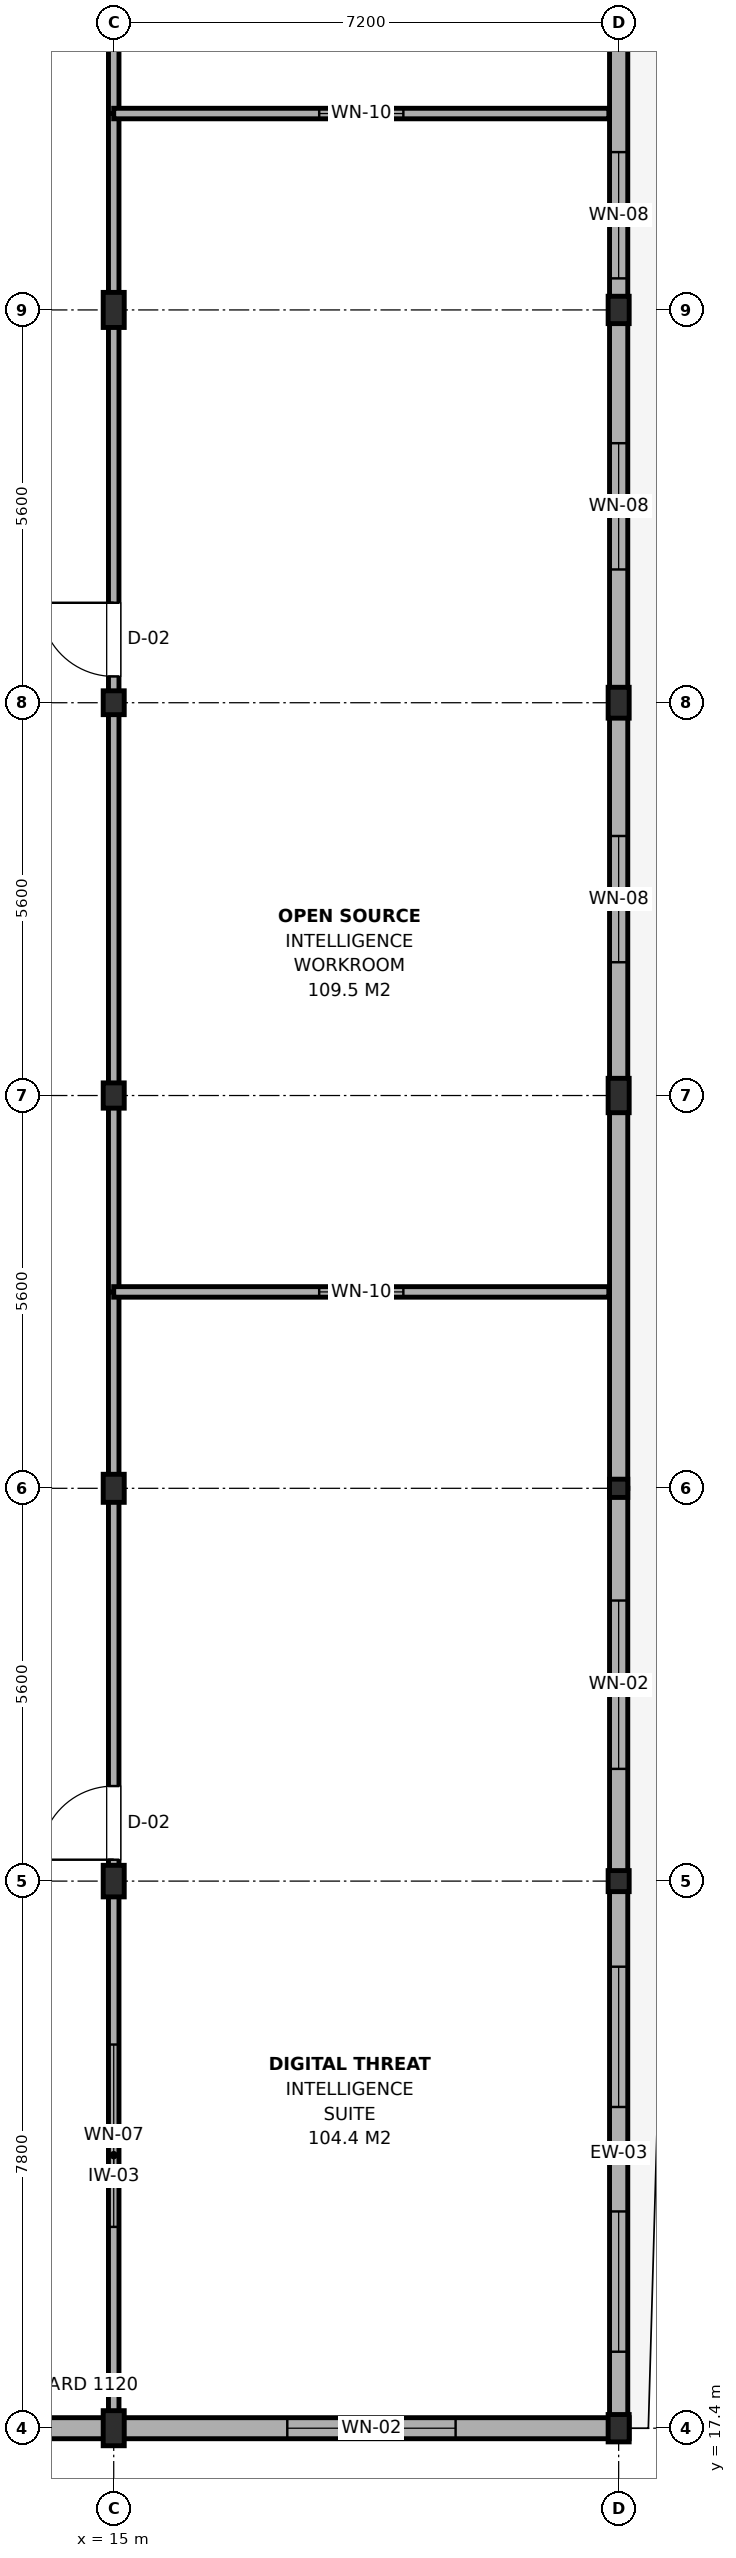
"""IFC4 building model, lengths in metres.
Left out: names, types, materials, properties, quantities, classifications, styles, units other than length and angle.
Written with IfcOpenShell. Run it as: python <this file> out.ifc"""

import sys

from ifc_helpers import new_model, si_unit, direction, frame, frame_2d, origin, origin_2d, place, context, subcontext, project, spatial, rectangle, i_section, extrude, element, fill, save


model = new_model("IFC4")
c1 = context("Model", 3, precision=1e-05, world=origin(), true_north=direction((0.0, 1.0)))
c2 = subcontext(c1, "Body", "Model", "MODEL_VIEW")
j1 = project(units=[si_unit("LENGTHUNIT", "METRE"), si_unit("PLANEANGLEUNIT", "RADIAN")], contexts=[c1])
p1 = place(None, origin())
s1 = spatial("IfcSite", under=j1, at=p1, CompositionType="ELEMENT")
p2 = place(p1, origin())
s2 = spatial("IfcBuilding", under=s1, at=p2, CompositionType="ELEMENT")
p3 = place(p2, frame((0.0, 0.0, 21.0)))
s3 = spatial("IfcBuildingStorey", under=s2, at=p3, CompositionType="ELEMENT", Elevation=21.0)
p4 = place(p3, frame((15.0, 17.4, 0.0), z_axis=(0.0, 0.0, 1.0), x_axis=(1.0, 0.0, 0.0)))
e1 = element("IfcColumn", 1, at=p4, inside=s3, PredefinedType="COLUMN", context=c2, shape_type="SweptSolid", body=[
    extrude(i_section(OverallWidth=0.3, OverallDepth=0.5, WebThickness=0.014, FlangeThickness=0.028, FilletRadius=0.027, at=origin_2d()), origin(), (0.0, 0.0, 1.0), 3.9),
])
p5 = place(p3, frame((15.0, 25.2, 0.0), z_axis=(0.0, 0.0, 1.0), x_axis=(1.0, 0.0, 0.0)))
e2 = element("IfcColumn", 2, at=p5, inside=s3, PredefinedType="COLUMN", context=c2, shape_type="SweptSolid", body=[
    extrude(i_section(OverallWidth=0.3, OverallDepth=0.45, WebThickness=0.014, FlangeThickness=0.026, FilletRadius=0.027, at=origin_2d()), origin(), (0.0, 0.0, 1.0), 3.9),
])
p6 = place(p3, frame((15.0, 30.8, 0.0), z_axis=(0.0, 0.0, 1.0), x_axis=(1.0, 0.0, 0.0)))
e3 = element("IfcColumn", 3, at=p6, inside=s3, PredefinedType="COLUMN", context=c2, shape_type="SweptSolid", body=[
    extrude(i_section(OverallWidth=0.3, OverallDepth=0.4, WebThickness=0.013, FlangeThickness=0.024, FilletRadius=0.027, at=origin_2d()), origin(), (0.0, 0.0, 1.0), 3.9),
])
p7 = place(p3, frame((15.0, 36.4, 0.0), z_axis=(0.0, 0.0, 1.0), x_axis=(1.0, 0.0, 0.0)))
e4 = element("IfcColumn", 4, at=p7, inside=s3, PredefinedType="COLUMN", context=c2, shape_type="SweptSolid", body=[
    extrude(i_section(OverallWidth=0.3, OverallDepth=0.36, WebThickness=0.012, FlangeThickness=0.022, FilletRadius=0.027, at=origin_2d()), origin(), (0.0, 0.0, 1.0), 3.9),
])
p8 = place(p3, frame((15.0, 42.0, 0.0), z_axis=(0.0, 0.0, 1.0), x_axis=(1.0, 0.0, 0.0)))
e5 = element("IfcColumn", 5, at=p8, inside=s3, PredefinedType="COLUMN", context=c2, shape_type="SweptSolid", body=[
    extrude(i_section(OverallWidth=0.3, OverallDepth=0.34, WebThickness=0.012, FlangeThickness=0.021, FilletRadius=0.027, at=origin_2d()), origin(), (0.0, 0.0, 1.0), 3.9),
])
p9 = place(p3, frame((15.0, 47.6, 0.0), z_axis=(0.0, 0.0, 1.0), x_axis=(1.0, 0.0, 0.0)))
e6 = element("IfcColumn", 6, at=p9, inside=s3, PredefinedType="COLUMN", context=c2, shape_type="SweptSolid", body=[
    extrude(i_section(OverallWidth=0.3, OverallDepth=0.5, WebThickness=0.014, FlangeThickness=0.028, FilletRadius=0.027, at=origin_2d()), origin(), (0.0, 0.0, 1.0), 3.9),
])
p10 = place(p3, frame((22.2, 17.4, 0.0), z_axis=(0.0, 0.0, 1.0), x_axis=(1.0, 0.0, 0.0)))
e7 = element("IfcColumn", 7, at=p10, inside=s3, PredefinedType="COLUMN", context=c2, shape_type="SweptSolid", body=[
    extrude(i_section(OverallWidth=0.3, OverallDepth=0.39, WebThickness=0.011, FlangeThickness=0.019, FilletRadius=0.027, at=origin_2d()), origin(), (0.0, 0.0, 1.0), 3.9),
])
p11 = place(p3, frame((22.2, 25.2, 0.0), z_axis=(0.0, 0.0, 1.0), x_axis=(1.0, 0.0, 0.0)))
e8 = element("IfcColumn", 8, at=p11, inside=s3, PredefinedType="COLUMN", context=c2, shape_type="SweptSolid", body=[
    extrude(i_section(OverallWidth=0.3, OverallDepth=0.3, WebThickness=0.011, FlangeThickness=0.019, FilletRadius=0.027, at=origin_2d()), origin(), (0.0, 0.0, 1.0), 3.9),
])
p12 = place(p3, frame((22.2, 30.8, 0.0), z_axis=(0.0, 0.0, 1.0), x_axis=(1.0, 0.0, 0.0)))
e9 = element("IfcColumn", 9, at=p12, inside=s3, PredefinedType="COLUMN", context=c2, shape_type="SweptSolid", body=[
    extrude(i_section(OverallWidth=0.26, OverallDepth=0.26, WebThickness=0.01, FlangeThickness=0.018, FilletRadius=0.024, at=origin_2d()), origin(), (0.0, 0.0, 1.0), 3.9),
])
p13 = place(p3, frame((22.2, 36.4, 0.0), z_axis=(0.0, 0.0, 1.0), x_axis=(1.0, 0.0, 0.0)))
e10 = element("IfcColumn", 10, at=p13, inside=s3, PredefinedType="COLUMN", context=c2, shape_type="SweptSolid", body=[
    extrude(i_section(OverallWidth=0.3, OverallDepth=0.49, WebThickness=0.012, FlangeThickness=0.023, FilletRadius=0.027, at=origin_2d()), origin(), (0.0, 0.0, 1.0), 3.9),
])
p14 = place(p3, frame((22.2, 42.0, 0.0), z_axis=(0.0, 0.0, 1.0), x_axis=(1.0, 0.0, 0.0)))
e11 = element("IfcColumn", 11, at=p14, inside=s3, PredefinedType="COLUMN", context=c2, shape_type="SweptSolid", body=[
    extrude(i_section(OverallWidth=0.3, OverallDepth=0.44, WebThickness=0.011, FlangeThickness=0.021, FilletRadius=0.027, at=origin_2d()), origin(), (0.0, 0.0, 1.0), 3.9),
])
p15 = place(p3, frame((22.2, 47.6, 0.0), z_axis=(0.0, 0.0, 1.0), x_axis=(1.0, 0.0, 0.0)))
e12 = element("IfcColumn", 12, at=p15, inside=s3, PredefinedType="COLUMN", context=c2, shape_type="SweptSolid", body=[
    extrude(i_section(OverallWidth=0.3, OverallDepth=0.39, WebThickness=0.011, FlangeThickness=0.019, FilletRadius=0.027, at=origin_2d()), origin(), (0.0, 0.0, 1.0), 3.9),
])
p16 = place(p3, frame((22.2, 17.27, 0.0), z_axis=(0.0, 0.0, 1.0), x_axis=(0.0, 1.0, 0.0)))
e13 = element("IfcWall", 13, at=p16, inside=s3, PredefinedType="SOLIDWALL", context=c2, shape_type="SweptSolid", body=[
    extrude(rectangle(XDim=7.93, YDim=0.26, at=frame_2d((3.965, 0.0))), origin(), (0.0, 0.0, 1.0), 3.245),
])
p17 = place(p16, frame((1.22, 0.0, 0.9)))
e14 = element("IfcOpeningElement", 14, at=p17, cuts=e13, PredefinedType="OPENING", context=c2, shape_type="SweptSolid", body=[
    extrude(rectangle(XDim=2.0, YDim=1.8, at=frame_2d((1.0, 0.9))), frame((0.0, 0.145, 0.0), z_axis=(0.0, -1.0, 0.0), x_axis=(1.0, 0.0, 0.0)), (0.0, 0.0, 1.0), 0.29),
])
p18 = place(p16, frame((4.71, 0.0, 0.9)))
e15 = element("IfcOpeningElement", 15, at=p18, cuts=e13, PredefinedType="OPENING", context=c2, shape_type="SweptSolid", body=[
    extrude(rectangle(XDim=2.0, YDim=1.8, at=frame_2d((1.0, 0.9))), frame((0.0, 0.145, 0.0), z_axis=(0.0, -1.0, 0.0), x_axis=(1.0, 0.0, 0.0)), (0.0, 0.0, 1.0), 0.29),
])
p19 = place(p3, frame((22.2, 25.2, 0.0), z_axis=(0.0, 0.0, 1.0), x_axis=(0.0, 1.0, 0.0)))
e16 = element("IfcWall", 16, at=p19, inside=s3, PredefinedType="SOLIDWALL", context=c2, shape_type="SweptSolid", body=[
    extrude(rectangle(XDim=5.6, YDim=0.26, at=frame_2d((2.8, 0.0))), origin(), (0.0, 0.0, 1.0), 3.245),
])
p20 = place(p19, frame((1.6, 0.0, 0.9)))
e17 = element("IfcOpeningElement", 17, at=p20, cuts=e16, PredefinedType="OPENING", context=c2, shape_type="SweptSolid", body=[
    extrude(rectangle(XDim=2.4, YDim=2.1, at=frame_2d((1.2, 1.05))), frame((0.0, 0.145, 0.0), z_axis=(0.0, -1.0, 0.0), x_axis=(1.0, 0.0, 0.0)), (0.0, 0.0, 1.0), 0.29),
])
p21 = place(p3, frame((22.2, 30.8, 0.0), z_axis=(0.0, 0.0, 1.0), x_axis=(0.0, 1.0, 0.0)))
e18 = element("IfcWall", 18, at=p21, inside=s3, PredefinedType="SOLIDWALL", context=c2, shape_type="SweptSolid", body=[
    extrude(rectangle(XDim=5.6, YDim=0.26, at=frame_2d((2.8, 0.0))), origin(), (0.0, 0.0, 1.0), 3.095),
])
p22 = place(p3, frame((22.2, 36.4, 0.0), z_axis=(0.0, 0.0, 1.0), x_axis=(0.0, 1.0, 0.0)))
e19 = element("IfcWall", 19, at=p22, inside=s3, PredefinedType="SOLIDWALL", context=c2, shape_type="SweptSolid", body=[
    extrude(rectangle(XDim=5.6, YDim=0.26, at=frame_2d((2.8, 0.0))), origin(), (0.0, 0.0, 1.0), 3.095),
])
p23 = place(p22, frame((1.9, 0.0, 0.65)))
e20 = element("IfcOpeningElement", 20, at=p23, cuts=e19, PredefinedType="OPENING", context=c2, shape_type="SweptSolid", body=[
    extrude(rectangle(XDim=1.8, YDim=1.2, at=frame_2d((0.9, 0.6))), frame((0.0, 0.145, 0.0), z_axis=(0.0, -1.0, 0.0), x_axis=(1.0, 0.0, 0.0)), (0.0, 0.0, 1.0), 0.29),
])
p24 = place(p3, frame((22.2, 42.0, 0.0), z_axis=(0.0, 0.0, 1.0), x_axis=(0.0, 1.0, 0.0)))
e21 = element("IfcWall", 21, at=p24, inside=s3, PredefinedType="SOLIDWALL", context=c2, shape_type="SweptSolid", body=[
    extrude(rectangle(XDim=5.6, YDim=0.26, at=frame_2d((2.8, 0.0))), origin(), (0.0, 0.0, 1.0), 3.095),
])
p25 = place(p24, frame((1.9, 0.0, 0.65)))
e22 = element("IfcOpeningElement", 22, at=p25, cuts=e21, PredefinedType="OPENING", context=c2, shape_type="SweptSolid", body=[
    extrude(rectangle(XDim=1.8, YDim=1.2, at=frame_2d((0.9, 0.6))), frame((0.0, 0.145, 0.0), z_axis=(0.0, -1.0, 0.0), x_axis=(1.0, 0.0, 0.0)), (0.0, 0.0, 1.0), 0.29),
])
p26 = place(p3, frame((22.2, 47.6, 0.0), z_axis=(0.0, 0.0, 1.0), x_axis=(0.0, 1.0, 0.0)))
e23 = element("IfcWall", 23, at=p26, inside=s3, PredefinedType="SOLIDWALL", context=c2, shape_type="SweptSolid", body=[
    extrude(rectangle(XDim=5.6, YDim=0.26, at=frame_2d((2.8, 0.0))), origin(), (0.0, 0.0, 1.0), 3.145),
])
p27 = place(p26, frame((0.45, 0.0, 0.65)))
e24 = element("IfcOpeningElement", 24, at=p27, cuts=e23, PredefinedType="OPENING", context=c2, shape_type="SweptSolid", body=[
    extrude(rectangle(XDim=1.8, YDim=1.2, at=frame_2d((0.9, 0.6))), frame((0.0, 0.145, 0.0), z_axis=(0.0, -1.0, 0.0), x_axis=(1.0, 0.0, 0.0)), (0.0, 0.0, 1.0), 0.29),
])
p28 = place(p3, frame((7.8, 17.4, 0.0), z_axis=(0.0, 0.0, 1.0), x_axis=(1.0, 0.0, 0.0)))
e25 = element("IfcWall", 25, at=p28, inside=s3, PredefinedType="SOLIDWALL", context=c2, shape_type="SweptSolid", body=[
    extrude(rectangle(XDim=7.2, YDim=0.3, at=frame_2d((3.6, 0.0))), origin(), (0.0, 0.0, 1.0), 3.245),
])
p29 = place(p28, frame((1.45, 0.0, 0.9)))
e26 = element("IfcOpeningElement", 26, at=p29, cuts=e25, PredefinedType="OPENING", context=c2, shape_type="SweptSolid", body=[
    extrude(rectangle(XDim=2.4, YDim=2.1, at=frame_2d((1.2, 1.05))), frame((0.0, 0.165, 0.0), z_axis=(0.0, -1.0, 0.0), x_axis=(1.0, 0.0, 0.0)), (0.0, 0.0, 1.0), 0.33),
])
p30 = place(p3, frame((15.0, 17.4, 0.0), z_axis=(0.0, 0.0, 1.0), x_axis=(1.0, 0.0, 0.0)))
e27 = element("IfcWall", 27, at=p30, inside=s3, PredefinedType="SOLIDWALL", context=c2, shape_type="SweptSolid", body=[
    extrude(rectangle(XDim=7.35, YDim=0.3, at=frame_2d((3.675, 0.0))), origin(), (0.0, 0.0, 1.0), 3.345),
])
p31 = place(p30, frame((2.475, 0.0, 0.9)))
e28 = element("IfcOpeningElement", 28, at=p31, cuts=e27, PredefinedType="OPENING", context=c2, shape_type="SweptSolid", body=[
    extrude(rectangle(XDim=2.4, YDim=2.1, at=frame_2d((1.2, 1.05))), frame((0.0, 0.165, 0.0), z_axis=(0.0, -1.0, 0.0), x_axis=(1.0, 0.0, 0.0)), (0.0, 0.0, 1.0), 0.33),
])
p32 = place(p3, frame((15.0, 17.56, 0.0), z_axis=(0.0, 0.0, 1.0), x_axis=(0.0, 1.0, 0.0)))
e29 = element("IfcWall", 29, at=p32, inside=s3, PredefinedType="PARTITIONING", context=c2, shape_type="SweptSolid", body=[
    extrude(rectangle(XDim=16.04, YDim=0.15, at=frame_2d((8.02, 0.0))), origin(), (0.0, 0.0, 1.0), 3.095),
])
p33 = place(p32, frame((7.945, 0.0, 0.0)))
e30 = element("IfcOpeningElement", 30, at=p33, cuts=e29, PredefinedType="OPENING", context=c2, shape_type="SweptSolid", body=[
    extrude(rectangle(XDim=1.05, YDim=2.15, at=frame_2d((0.525, 1.075))), frame((0.0, 0.09, 0.0), z_axis=(0.0, -1.0, 0.0), x_axis=(1.0, 0.0, 0.0)), (0.0, 0.0, 1.0), 0.18),
])
p34 = place(p32, frame((2.71, 0.0, 0.95)))
e31 = element("IfcOpeningElement", 31, at=p34, cuts=e29, PredefinedType="OPENING", context=c2, shape_type="SweptSolid", body=[
    extrude(rectangle(XDim=2.6, YDim=1.5, at=frame_2d((1.3, 0.75))), frame((0.0, 0.09, 0.0), z_axis=(0.0, -1.0, 0.0), x_axis=(1.0, 0.0, 0.0)), (0.0, 0.0, 1.0), 0.18),
])
p35 = place(p3, frame((15.0, 33.6, 0.0), z_axis=(0.0, 0.0, 1.0), x_axis=(0.0, 1.0, 0.0)))
e32 = element("IfcWall", 32, at=p35, inside=s3, PredefinedType="PARTITIONING", context=c2, shape_type="SweptSolid", body=[
    extrude(rectangle(XDim=16.8, YDim=0.15, at=frame_2d((8.4, 0.0))), origin(), (0.0, 0.0, 1.0), 3.095),
])
p36 = place(p35, frame((8.775, 0.0, 0.0)))
e33 = element("IfcOpeningElement", 33, at=p36, cuts=e32, PredefinedType="OPENING", context=c2, shape_type="SweptSolid", body=[
    extrude(rectangle(XDim=1.05, YDim=2.15, at=frame_2d((0.525, 1.075))), frame((0.0, 0.09, 0.0), z_axis=(0.0, -1.0, 0.0), x_axis=(1.0, 0.0, 0.0)), (0.0, 0.0, 1.0), 0.18),
])
p37 = place(p3, frame((15.0, 33.6, 0.0), z_axis=(0.0, 0.0, 1.0), x_axis=(1.0, 0.0, 0.0)))
e34 = element("IfcWall", 34, at=p37, inside=s3, PredefinedType="PARTITIONING", context=c2, shape_type="SweptSolid", body=[
    extrude(rectangle(XDim=7.06, YDim=0.15, at=frame_2d((3.53, 0.0))), origin(), (0.0, 0.0, 1.0), 3.145),
])
p38 = place(p37, frame((2.93, 0.0, 0.95)))
e35 = element("IfcOpeningElement", 35, at=p38, cuts=e34, PredefinedType="OPENING", context=c2, shape_type="SweptSolid", body=[
    extrude(rectangle(XDim=1.2, YDim=1.5, at=frame_2d((0.6, 0.75))), frame((0.0, 0.09, 0.0), z_axis=(0.0, -1.0, 0.0), x_axis=(1.0, 0.0, 0.0)), (0.0, 0.0, 1.0), 0.18),
])
p39 = place(p3, frame((15.0, 50.4, 0.0), z_axis=(0.0, 0.0, 1.0), x_axis=(0.0, 1.0, 0.0)))
e36 = element("IfcWall", 36, at=p39, inside=s3, PredefinedType="PARTITIONING", context=c2, shape_type="SweptSolid", body=[
    extrude(rectangle(XDim=16.2, YDim=0.15, at=frame_2d((8.1, 0.0))), origin(), (0.0, 0.0, 1.0), 3.095),
])
p40 = place(p39, frame((7.125, 0.0, 0.0)))
e37 = element("IfcOpeningElement", 37, at=p40, cuts=e36, PredefinedType="OPENING", context=c2, shape_type="SweptSolid", body=[
    extrude(rectangle(XDim=1.05, YDim=2.15, at=frame_2d((0.525, 1.075))), frame((0.0, 0.09, 0.0), z_axis=(0.0, -1.0, 0.0), x_axis=(1.0, 0.0, 0.0)), (0.0, 0.0, 1.0), 0.18),
])
p41 = place(p39, frame((10.85, 0.0, 0.95)))
e38 = element("IfcOpeningElement", 38, at=p41, cuts=e36, PredefinedType="OPENING", context=c2, shape_type="SweptSolid", body=[
    extrude(rectangle(XDim=2.6, YDim=1.5, at=frame_2d((1.3, 0.75))), frame((0.0, 0.09, 0.0), z_axis=(0.0, -1.0, 0.0), x_axis=(1.0, 0.0, 0.0)), (0.0, 0.0, 1.0), 0.18),
])
p42 = place(p3, frame((15.0, 50.4, 0.0), z_axis=(0.0, 0.0, 1.0), x_axis=(1.0, 0.0, 0.0)))
e39 = element("IfcWall", 39, at=p42, inside=s3, PredefinedType="PARTITIONING", context=c2, shape_type="SweptSolid", body=[
    extrude(rectangle(XDim=7.06, YDim=0.15, at=frame_2d((3.53, 0.0))), origin(), (0.0, 0.0, 1.0), 3.195),
])
p43 = place(p42, frame((2.93, 0.0, 0.95)))
e40 = element("IfcOpeningElement", 40, at=p43, cuts=e39, PredefinedType="OPENING", context=c2, shape_type="SweptSolid", body=[
    extrude(rectangle(XDim=1.2, YDim=1.5, at=frame_2d((0.6, 0.75))), frame((0.0, 0.09, 0.0), z_axis=(0.0, -1.0, 0.0), x_axis=(1.0, 0.0, 0.0)), (0.0, 0.0, 1.0), 0.18),
])
p44 = place(p17, origin())
e41 = element("IfcWindow", 41, at=p44, inside=s3, PartitioningType="SINGLE_PANEL", PredefinedType="WINDOW", context=c2, shape_type="SweptSolid", body=[
    extrude(rectangle(XDim=2.0, YDim=1.8, at=frame_2d((1.0, 0.9))), frame((0.0, 0.03, 0.0), z_axis=(0.0, -1.0, 0.0), x_axis=(1.0, 0.0, 0.0)), (0.0, 0.0, 1.0), 0.06),
])
fill(e14, e41)
p45 = place(p18, origin())
e42 = element("IfcWindow", 42, at=p45, inside=s3, PartitioningType="SINGLE_PANEL", PredefinedType="WINDOW", context=c2, shape_type="SweptSolid", body=[
    extrude(rectangle(XDim=2.0, YDim=1.8, at=frame_2d((1.0, 0.9))), frame((0.0, 0.03, 0.0), z_axis=(0.0, -1.0, 0.0), x_axis=(1.0, 0.0, 0.0)), (0.0, 0.0, 1.0), 0.06),
])
fill(e15, e42)
p46 = place(p20, origin())
e43 = element("IfcWindow", 43, at=p46, inside=s3, PartitioningType="SINGLE_PANEL", PredefinedType="WINDOW", context=c2, shape_type="SweptSolid", body=[
    extrude(rectangle(XDim=2.4, YDim=2.1, at=frame_2d((1.2, 1.05))), frame((0.0, 0.03, 0.0), z_axis=(0.0, -1.0, 0.0), x_axis=(1.0, 0.0, 0.0)), (0.0, 0.0, 1.0), 0.06),
])
fill(e17, e43)
p47 = place(p23, origin())
e44 = element("IfcWindow", 44, at=p47, inside=s3, PartitioningType="SINGLE_PANEL", PredefinedType="WINDOW", context=c2, shape_type="SweptSolid", body=[
    extrude(rectangle(XDim=1.8, YDim=1.2, at=frame_2d((0.9, 0.6))), frame((0.0, 0.03, 0.0), z_axis=(0.0, -1.0, 0.0), x_axis=(1.0, 0.0, 0.0)), (0.0, 0.0, 1.0), 0.06),
])
fill(e20, e44)
p48 = place(p25, origin())
e45 = element("IfcWindow", 45, at=p48, inside=s3, PartitioningType="SINGLE_PANEL", PredefinedType="WINDOW", context=c2, shape_type="SweptSolid", body=[
    extrude(rectangle(XDim=1.8, YDim=1.2, at=frame_2d((0.9, 0.6))), frame((0.0, 0.03, 0.0), z_axis=(0.0, -1.0, 0.0), x_axis=(1.0, 0.0, 0.0)), (0.0, 0.0, 1.0), 0.06),
])
fill(e22, e45)
p49 = place(p27, origin())
e46 = element("IfcWindow", 46, at=p49, inside=s3, PartitioningType="SINGLE_PANEL", PredefinedType="WINDOW", context=c2, shape_type="SweptSolid", body=[
    extrude(rectangle(XDim=1.8, YDim=1.2, at=frame_2d((0.9, 0.6))), frame((0.0, 0.03, 0.0), z_axis=(0.0, -1.0, 0.0), x_axis=(1.0, 0.0, 0.0)), (0.0, 0.0, 1.0), 0.06),
])
fill(e24, e46)
p50 = place(p31, origin())
e47 = element("IfcWindow", 47, at=p50, inside=s3, PartitioningType="SINGLE_PANEL", PredefinedType="WINDOW", context=c2, shape_type="SweptSolid", body=[
    extrude(rectangle(XDim=2.4, YDim=2.1, at=frame_2d((1.2, 1.05))), frame((0.0, 0.03, 0.0), z_axis=(0.0, -1.0, 0.0), x_axis=(1.0, 0.0, 0.0)), (0.0, 0.0, 1.0), 0.06),
])
fill(e28, e47)
p51 = place(p33, origin())
e48 = element("IfcDoor", 48, at=p51, inside=s3, OperationType="SINGLE_SWING_LEFT", PredefinedType="DOOR", context=c2, shape_type="SweptSolid", body=[
    extrude(rectangle(XDim=1.05, YDim=2.15, at=frame_2d((0.525, 1.075))), frame((0.0, 0.025, 0.0), z_axis=(0.0, -1.0, 0.0), x_axis=(1.0, 0.0, 0.0)), (0.0, 0.0, 1.0), 0.05),
])
fill(e30, e48)
p52 = place(p34, origin())
e49 = element("IfcWindow", 49, at=p52, inside=s3, PartitioningType="SINGLE_PANEL", PredefinedType="WINDOW", context=c2, shape_type="SweptSolid", body=[
    extrude(rectangle(XDim=2.6, YDim=1.5, at=frame_2d((1.3, 0.75))), frame((0.0, 0.03, 0.0), z_axis=(0.0, -1.0, 0.0), x_axis=(1.0, 0.0, 0.0)), (0.0, 0.0, 1.0), 0.06),
])
fill(e31, e49)
p53 = place(p36, origin())
e50 = element("IfcDoor", 50, at=p53, inside=s3, OperationType="SINGLE_SWING_RIGHT", PredefinedType="DOOR", context=c2, shape_type="SweptSolid", body=[
    extrude(rectangle(XDim=1.05, YDim=2.15, at=frame_2d((0.525, 1.075))), frame((0.0, 0.025, 0.0), z_axis=(0.0, -1.0, 0.0), x_axis=(1.0, 0.0, 0.0)), (0.0, 0.0, 1.0), 0.05),
])
fill(e33, e50)
p54 = place(p38, origin())
e51 = element("IfcWindow", 51, at=p54, inside=s3, PartitioningType="SINGLE_PANEL", PredefinedType="WINDOW", context=c2, shape_type="SweptSolid", body=[
    extrude(rectangle(XDim=1.2, YDim=1.5, at=frame_2d((0.6, 0.75))), frame((0.0, 0.03, 0.0), z_axis=(0.0, -1.0, 0.0), x_axis=(1.0, 0.0, 0.0)), (0.0, 0.0, 1.0), 0.06),
])
fill(e35, e51)
p55 = place(p43, origin())
e52 = element("IfcWindow", 52, at=p55, inside=s3, PartitioningType="SINGLE_PANEL", PredefinedType="WINDOW", context=c2, shape_type="SweptSolid", body=[
    extrude(rectangle(XDim=1.2, YDim=1.5, at=frame_2d((0.6, 0.75))), frame((0.0, 0.03, 0.0), z_axis=(0.0, -1.0, 0.0), x_axis=(1.0, 0.0, 0.0)), (0.0, 0.0, 1.0), 0.06),
])
fill(e40, e52)
save(model, sys.argv[1])
